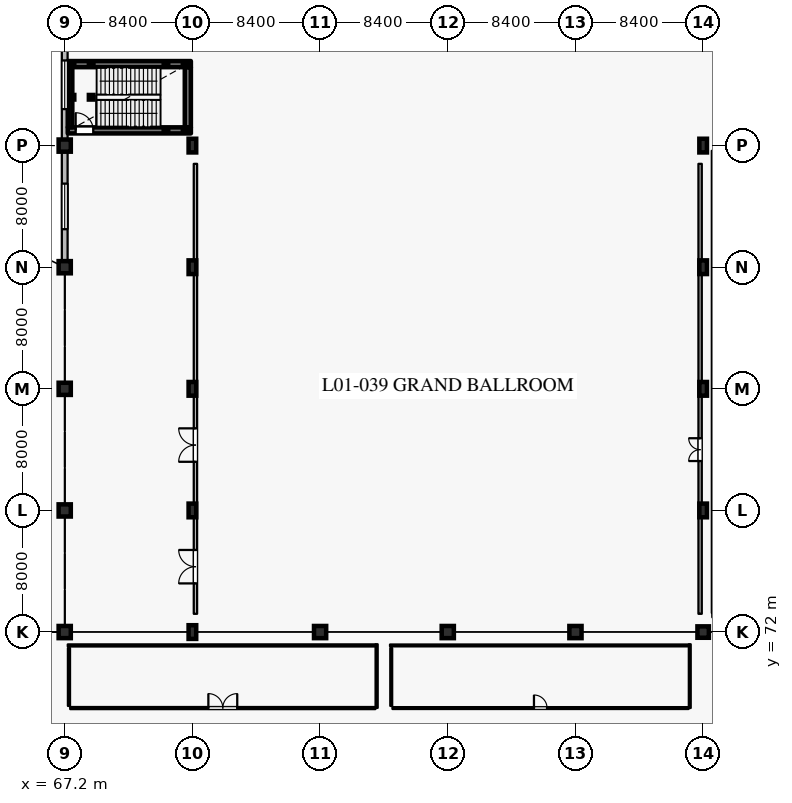
"""IFC4 building model, lengths in metres.
Left out: names, types, materials, properties, quantities, classifications, styles, units other than length and angle.
Written with IfcOpenShell. Run it as: python <this file> out.ifc"""

import sys

from ifc_helpers import new_model, si_unit, direction, frame, frame_2d, origin, origin_2d, place, context, subcontext, project, spatial, rectangle, hollow_rectangle, extrude, element, fill, save


model = new_model("IFC4")
c1 = context("Model", 3, precision=1e-05, world=origin(), true_north=direction((0.0, 1.0)))
c2 = subcontext(c1, "Body", "Model", "MODEL_VIEW")
j1 = project(units=[si_unit("LENGTHUNIT", "METRE"), si_unit("PLANEANGLEUNIT", "RADIAN")], contexts=[c1])
p1 = place(None, origin())
s1 = spatial("IfcSite", under=j1, at=p1, CompositionType="ELEMENT")
p2 = place(p1, origin())
s2 = spatial("IfcBuilding", under=s1, at=p2, CompositionType="ELEMENT")
p3 = place(p2, frame((0.0, 0.0, 6.0)))
s3 = spatial("IfcBuildingStorey", under=s2, at=p3, CompositionType="ELEMENT", Elevation=6.0)
for number, where, z_axis, x_axis in (
    (1, (67.2, 72.0, 0.0), (0.0, 0.0, 1.0), (1.0, 0.0, 0.0)),
    (2, (67.2, 80.0, 0.0), (0.0, 0.0, 1.0), (1.0, 0.0, 0.0)),
    (3, (67.2, 88.0, 0.0), (0.0, 0.0, 1.0), (1.0, 0.0, 0.0)),
    (4, (67.2, 96.0, 0.0), (0.0, 0.0, 1.0), (1.0, 0.0, 0.0)),
    (5, (67.2, 104.0, 0.0), (0.0, 0.0, 1.0), (1.0, 0.0, 0.0)),
):
    element("IfcColumn", number, at=place(p3, frame(where, z_axis=z_axis, x_axis=x_axis)), inside=s3, PredefinedType="COLUMN", context=c2, shape_type="SweptSolid", body=[
        extrude(rectangle(XDim=0.8, YDim=0.8, at=origin_2d()), origin(), (0.0, 0.0, 1.0), 5.4),
    ])
for number, where, z_axis, x_axis in (
    (6, (75.6, 72.0, 0.0), (0.0, 0.0, 1.0), (1.0, 0.0, 0.0)),
    (7, (75.6, 80.0, 0.0), (0.0, 0.0, 1.0), (1.0, 0.0, 0.0)),
    (8, (75.6, 88.0, 0.0), (0.0, 0.0, 1.0), (1.0, 0.0, 0.0)),
    (9, (75.6, 96.0, 0.0), (0.0, 0.0, 1.0), (1.0, 0.0, 0.0)),
    (10, (75.6, 104.0, 0.0), (0.0, 0.0, 1.0), (1.0, 0.0, 0.0)),
):
    element("IfcColumn", number, at=place(p3, frame(where, z_axis=z_axis, x_axis=x_axis)), inside=s3, PredefinedType="COLUMN", context=c2, shape_type="SweptSolid", body=[
        extrude(hollow_rectangle(XDim=0.5, YDim=0.9, WallThickness=0.024, at=origin_2d()), origin(), (0.0, 0.0, 1.0), 5.4),
    ])
for number, where, z_axis, x_axis in (
    (11, (84.0, 72.0, 0.0), (0.0, 0.0, 1.0), (1.0, 0.0, 0.0)),
    (12, (92.4, 72.0, 0.0), (0.0, 0.0, 1.0), (1.0, 0.0, 0.0)),
    (13, (100.8, 72.0, 0.0), (0.0, 0.0, 1.0), (1.0, 0.0, 0.0)),
):
    element("IfcColumn", number, at=place(p3, frame(where, z_axis=z_axis, x_axis=x_axis)), inside=s3, PredefinedType="COLUMN", context=c2, shape_type="SweptSolid", body=[
        extrude(rectangle(XDim=0.8, YDim=0.8, at=origin_2d()), origin(), (0.0, 0.0, 1.0), 5.4),
    ])
p4 = place(p3, frame((109.2, 72.0, 0.0), z_axis=(0.0, 0.0, 1.0), x_axis=(1.0, 0.0, 0.0)))
e14 = element("IfcColumn", 14, at=p4, inside=s3, PredefinedType="COLUMN", context=c2, shape_type="SweptSolid", body=[
    extrude(rectangle(XDim=0.75, YDim=0.75, at=origin_2d()), origin(), (0.0, 0.0, 1.0), 5.4),
])
for number, where, z_axis, x_axis in (
    (15, (109.2, 80.0, 0.0), (0.0, 0.0, 1.0), (1.0, 0.0, 0.0)),
    (16, (109.2, 88.0, 0.0), (0.0, 0.0, 1.0), (1.0, 0.0, 0.0)),
    (17, (109.2, 96.0, 0.0), (0.0, 0.0, 1.0), (1.0, 0.0, 0.0)),
    (18, (109.2, 104.0, 0.0), (0.0, 0.0, 1.0), (1.0, 0.0, 0.0)),
):
    element("IfcColumn", number, at=place(p3, frame(where, z_axis=z_axis, x_axis=x_axis)), inside=s3, PredefinedType="COLUMN", context=c2, shape_type="SweptSolid", body=[
        extrude(hollow_rectangle(XDim=0.5, YDim=0.9, WallThickness=0.024, at=origin_2d()), origin(), (0.0, 0.0, 1.0), 5.4),
    ])
p5 = place(p3, frame((67.2, 96.4, 0.0), z_axis=(0.0, 0.0, 1.0), x_axis=(0.0, 1.0, 0.0)))
e19 = element("IfcWall", 19, at=p5, inside=s3, PredefinedType="SOLIDWALL", context=c2, shape_type="SweptSolid", body=[
    extrude(rectangle(XDim=7.2, YDim=0.38, at=frame_2d((3.6, 0.0))), origin(), (0.0, 0.0, 1.0), 4.67),
])
p6 = place(p5, frame((2.1, 0.0, 1.05)))
e20 = element("IfcOpeningElement", 20, at=p6, cuts=e19, PredefinedType="OPENING", context=c2, shape_type="SweptSolid", body=[
    extrude(rectangle(XDim=3.0, YDim=2.2, at=frame_2d((1.5, 1.1))), frame((0.0, 0.2, 0.0), z_axis=(0.0, -1.0, 0.0), x_axis=(1.0, 0.0, 0.0)), (0.0, 0.0, 1.0), 0.4),
])
p7 = place(p3, frame((67.2, 104.4, 0.0), z_axis=(0.0, 0.0, 1.0), x_axis=(0.0, 1.0, 0.0)))
e21 = element("IfcWall", 21, at=p7, inside=s3, PredefinedType="SOLIDWALL", context=c2, shape_type="SweptSolid", body=[
    extrude(rectangle(XDim=7.2, YDim=0.38, at=frame_2d((3.6, 0.0))), origin(), (0.0, 0.0, 1.0), 4.67),
])
p8 = place(p7, frame((2.0, 0.0, 1.05)))
e22 = element("IfcOpeningElement", 22, at=p8, cuts=e21, PredefinedType="OPENING", context=c2, shape_type="SweptSolid", body=[
    extrude(rectangle(XDim=3.2, YDim=2.4, at=frame_2d((1.6, 1.2))), frame((0.0, 0.2, 0.0), z_axis=(0.0, -1.0, 0.0), x_axis=(1.0, 0.0, 0.0)), (0.0, 0.0, 1.0), 0.4),
])
p9 = place(p3, frame((67.4, 105.0, 0.0), z_axis=(0.0, 0.0, 1.0), x_axis=(1.0, 0.0, 0.0)))
e23 = element("IfcWall", 23, at=p9, inside=s3, PredefinedType="SHEAR", context=c2, shape_type="SweptSolid", body=[
    extrude(rectangle(XDim=8.1, YDim=0.4, at=frame_2d((4.05, 0.0))), origin(), (0.0, 0.0, 1.0), 5.045),
])
p10 = place(p9, frame((0.52, 0.0, 0.0)))
e24 = element("IfcOpeningElement", 24, at=p10, cuts=e23, PredefinedType="OPENING", context=c2, shape_type="SweptSolid", body=[
    extrude(rectangle(XDim=1.16, YDim=2.2, at=frame_2d((0.58, 1.1))), frame((0.0, 0.21, 0.0), z_axis=(0.0, -1.0, 0.0), x_axis=(1.0, 0.0, 0.0)), (0.0, 0.0, 1.0), 0.42),
])
p11 = place(p3, frame((75.3, 105.205, 0.0), z_axis=(0.0, 0.0, 1.0), x_axis=(0.0, 1.0, 0.0)))
e25 = element("IfcWall", 25, at=p11, inside=s3, PredefinedType="SHEAR", context=c2, shape_type="SweptSolid", body=[
    extrude(rectangle(XDim=3.95, YDim=0.4, at=frame_2d((1.975, 0.0))), origin(), (0.0, 0.0, 1.0), 5.045),
])
p12 = place(p3, frame((67.4, 109.36, 0.0), z_axis=(0.0, 0.0, 1.0), x_axis=(1.0, 0.0, 0.0)))
e26 = element("IfcWall", 26, at=p12, inside=s3, PredefinedType="SHEAR", context=c2, shape_type="SweptSolid", body=[
    extrude(rectangle(XDim=8.1, YDim=0.4, at=frame_2d((4.05, 0.0))), origin(), (0.0, 0.0, 1.0), 5.045),
])
p13 = place(p3, frame((67.55, 105.205, 0.0), z_axis=(0.0, 0.0, 1.0), x_axis=(0.0, 1.0, 0.0)))
e27 = element("IfcWall", 27, at=p13, inside=s3, PredefinedType="SHEAR", context=c2, shape_type="SweptSolid", body=[
    extrude(rectangle(XDim=3.95, YDim=0.3, at=frame_2d((1.975, 0.0))), origin(), (0.0, 0.0, 1.0), 5.045),
])
for number, where, z_axis, x_axis in (
    (28, (67.68, 107.18, 0.0), (0.0, 0.0, 1.0), (1.0, 0.0, 0.0)),
    (29, (67.68, 109.36, 0.0), (0.0, 0.0, 1.0), (1.0, 0.0, 0.0)),
    (30, (68.94, 107.18, 0.0), (0.0, 0.0, 1.0), (1.0, 0.0, 0.0)),
    (31, (68.94, 109.36, 0.0), (0.0, 0.0, 1.0), (1.0, 0.0, 0.0)),
):
    element("IfcColumn", number, at=place(p3, frame(where, z_axis=z_axis, x_axis=x_axis)), inside=s3, PredefinedType="COLUMN", context=c2, shape_type="SweptSolid", body=[
        extrude(hollow_rectangle(XDim=0.3, YDim=0.3, WallThickness=0.012, at=origin_2d()), origin(), (0.0, 0.0, 1.0), 5.22),
    ])
for number, where, z_axis, x_axis in (
    (32, (73.86, 105.0, -3.0), (0.0, 0.0, 1.0), (1.0, 0.0, 0.0)),
    (33, (73.86, 109.36, -3.0), (0.0, 0.0, 1.0), (1.0, 0.0, 0.0)),
    (34, (75.12, 105.0, -3.0), (0.0, 0.0, 1.0), (1.0, 0.0, 0.0)),
    (35, (75.12, 109.36, -3.0), (0.0, 0.0, 1.0), (1.0, 0.0, 0.0)),
):
    element("IfcColumn", number, at=place(p3, frame(where, z_axis=z_axis, x_axis=x_axis)), inside=s3, PredefinedType="COLUMN", context=c2, shape_type="SweptSolid", body=[
        extrude(hollow_rectangle(XDim=0.3, YDim=0.3, WallThickness=0.012, at=origin_2d()), origin(), (0.0, 0.0, 1.0), 5.52),
    ])
p14 = place(p3, frame((75.8, 73.2, 0.0), z_axis=(0.0, 0.0, 1.0), x_axis=(0.0, 1.0, 0.0)))
e36 = element("IfcWall", 36, at=p14, inside=s3, PredefinedType="PARTITIONING", context=c2, shape_type="SweptSolid", body=[
    extrude(rectangle(XDim=29.6, YDim=0.22, at=frame_2d((14.8, 0.0))), origin(), (0.0, 0.0, 1.0), 5.045),
])
p15 = place(p14, frame((2.0, 0.0, 0.0)))
e37 = element("IfcOpeningElement", 37, at=p15, cuts=e36, PredefinedType="OPENING", context=c2, shape_type="SweptSolid", body=[
    extrude(rectangle(XDim=2.2, YDim=2.6, at=frame_2d((1.1, 1.3))), frame((0.0, 0.12, 0.0), z_axis=(0.0, -1.0, 0.0), x_axis=(1.0, 0.0, 0.0)), (0.0, 0.0, 1.0), 0.24),
])
p16 = place(p14, frame((10.0, 0.0, 0.0)))
e38 = element("IfcOpeningElement", 38, at=p16, cuts=e36, PredefinedType="OPENING", context=c2, shape_type="SweptSolid", body=[
    extrude(rectangle(XDim=2.2, YDim=2.6, at=frame_2d((1.1, 1.3))), frame((0.0, 0.12, 0.0), z_axis=(0.0, -1.0, 0.0), x_axis=(1.0, 0.0, 0.0)), (0.0, 0.0, 1.0), 0.24),
])
p17 = place(p3, frame((109.0, 73.2, 0.0), z_axis=(0.0, 0.0, 1.0), x_axis=(0.0, 1.0, 0.0)))
e39 = element("IfcWall", 39, at=p17, inside=s3, PredefinedType="PARTITIONING", context=c2, shape_type="SweptSolid", body=[
    extrude(rectangle(XDim=29.6, YDim=0.22, at=frame_2d((14.8, 0.0))), origin(), (0.0, 0.0, 1.0), 5.045),
])
p18 = place(p17, frame((10.05, 0.0, 0.0)))
e40 = element("IfcOpeningElement", 40, at=p18, cuts=e39, PredefinedType="OPENING", context=c2, shape_type="SweptSolid", body=[
    extrude(rectangle(XDim=1.5, YDim=2.3, at=frame_2d((0.75, 1.15))), frame((0.0, 0.12, 0.0), z_axis=(0.0, -1.0, 0.0), x_axis=(1.0, 0.0, 0.0)), (0.0, 0.0, 1.0), 0.24),
])
p19 = place(p3, frame((109.88, 73.25, 0.0), z_axis=(0.0, 0.0, 1.0), x_axis=(0.0, 1.0, 0.0)))
e41 = element("IfcWall", 41, at=p19, inside=s3, PredefinedType="PARTITIONING", context=c2, shape_type="SweptSolid", body=[
    extrude(rectangle(XDim=30.41, YDim=0.22, at=frame_2d((15.205, 0.0))), origin(), (0.0, 0.0, 1.0), 5.045),
])
p20 = place(p3, frame((67.56, 67.0, 0.0), z_axis=(0.0, 0.0, 1.0), x_axis=(1.0, 0.0, 0.0)))
e42 = element("IfcWall", 42, at=p20, inside=s3, PredefinedType="PARTITIONING", context=c2, shape_type="SweptSolid", body=[
    extrude(rectangle(XDim=20.08, YDim=0.14, at=frame_2d((10.04, 0.0))), origin(), (0.0, 0.0, 1.0), 5.045),
])
p21 = place(p20, frame((9.09, 0.0, 0.0)))
e43 = element("IfcOpeningElement", 43, at=p21, cuts=e42, PredefinedType="OPENING", context=c2, shape_type="SweptSolid", body=[
    extrude(rectangle(XDim=1.9, YDim=2.4, at=frame_2d((0.95, 1.2))), frame((0.0, 0.08, 0.0), z_axis=(0.0, -1.0, 0.0), x_axis=(1.0, 0.0, 0.0)), (0.0, 0.0, 1.0), 0.16),
])
p22 = place(p3, frame((67.48, 67.14, 0.0), z_axis=(0.0, 0.0, 1.0), x_axis=(0.0, 1.0, 0.0)))
e44 = element("IfcWall", 44, at=p22, inside=s3, PredefinedType="PARTITIONING", context=c2, shape_type="SweptSolid", body=[
    extrude(rectangle(XDim=3.81, YDim=0.14, at=frame_2d((1.905, 0.0))), origin(), (0.0, 0.0, 1.0), 5.045),
])
p23 = place(p3, frame((88.76, 67.0, 0.0), z_axis=(0.0, 0.0, 1.0), x_axis=(1.0, 0.0, 0.0)))
e45 = element("IfcWall", 45, at=p23, inside=s3, PredefinedType="PARTITIONING", context=c2, shape_type="SweptSolid", body=[
    extrude(rectangle(XDim=19.48, YDim=0.125, at=frame_2d((9.74, 0.0))), origin(), (0.0, 0.0, 1.0), 5.045),
])
p24 = place(p23, frame((9.31, 0.0, 0.0)))
e46 = element("IfcOpeningElement", 46, at=p24, cuts=e45, PredefinedType="OPENING", context=c2, shape_type="SweptSolid", body=[
    extrude(rectangle(XDim=0.86, YDim=2.12, at=frame_2d((0.43, 1.06))), frame((0.0, 0.073, 0.0), z_axis=(0.0, -1.0, 0.0), x_axis=(1.0, 0.0, 0.0)), (0.0, 0.0, 1.0), 0.145),
])
p25 = place(p3, frame((88.68, 67.14, 0.0), z_axis=(0.0, 0.0, 1.0), x_axis=(0.0, 1.0, 0.0)))
e47 = element("IfcWall", 47, at=p25, inside=s3, PredefinedType="PARTITIONING", context=c2, shape_type="SweptSolid", body=[
    extrude(rectangle(XDim=3.81, YDim=0.125, at=frame_2d((1.905, 0.0))), origin(), (0.0, 0.0, 1.0), 5.045),
])
p26 = place(p3, frame((87.72, 67.012, 0.0), z_axis=(0.0, 0.0, 1.0), x_axis=(0.0, 1.0, 0.0)))
e48 = element("IfcWall", 48, at=p26, inside=s3, PredefinedType="PARTITIONING", context=c2, shape_type="SweptSolid", body=[
    extrude(rectangle(XDim=4.188, YDim=0.14, at=frame_2d((2.094, 0.0))), origin(), (0.0, 0.0, 1.0), 5.045),
])
p27 = place(p3, frame((67.4, 71.12, 0.0), z_axis=(0.0, 0.0, 1.0), x_axis=(1.0, 0.0, 0.0)))
e49 = element("IfcWall", 49, at=p27, inside=s3, PredefinedType="PARTITIONING", context=c2, shape_type="SweptSolid", body=[
    extrude(rectangle(XDim=20.25, YDim=0.14, at=frame_2d((10.125, 0.0))), origin(), (0.0, 0.0, 1.0), 5.045),
])
p28 = place(p3, frame((108.32, 67.004, 0.0), z_axis=(0.0, 0.0, 1.0), x_axis=(0.0, 1.0, 0.0)))
e50 = element("IfcWall", 50, at=p28, inside=s3, PredefinedType="PARTITIONING", context=c2, shape_type="SweptSolid", body=[
    extrude(rectangle(XDim=4.196, YDim=0.125, at=frame_2d((2.098, 0.0))), origin(), (0.0, 0.0, 1.0), 5.045),
])
p29 = place(p3, frame((88.6, 71.12, 0.0), z_axis=(0.0, 0.0, 1.0), x_axis=(1.0, 0.0, 0.0)))
e51 = element("IfcWall", 51, at=p29, inside=s3, PredefinedType="PARTITIONING", context=c2, shape_type="SweptSolid", body=[
    extrude(rectangle(XDim=19.658, YDim=0.125, at=frame_2d((9.829, 0.0))), origin(), (0.0, 0.0, 1.0), 5.045),
])
p30 = place(p6, origin())
e52 = element("IfcWindow", 52, at=p30, inside=s3, PartitioningType="DOUBLE_PANEL_VERTICAL", PredefinedType="WINDOW", context=c2, shape_type="SweptSolid", body=[
    extrude(rectangle(XDim=3.0, YDim=2.2, at=frame_2d((1.5, 1.1))), frame((0.0, 0.03, 0.0), z_axis=(0.0, -1.0, 0.0), x_axis=(1.0, 0.0, 0.0)), (0.0, 0.0, 1.0), 0.06),
])
fill(e20, e52)
p31 = place(p8, origin())
e53 = element("IfcWindow", 53, at=p31, inside=s3, PartitioningType="DOUBLE_PANEL_VERTICAL", PredefinedType="WINDOW", context=c2, shape_type="SweptSolid", body=[
    extrude(rectangle(XDim=3.2, YDim=2.4, at=frame_2d((1.6, 1.2))), frame((0.0, 0.03, 0.0), z_axis=(0.0, -1.0, 0.0), x_axis=(1.0, 0.0, 0.0)), (0.0, 0.0, 1.0), 0.06),
])
fill(e22, e53)
p32 = place(p10, origin())
e54 = element("IfcDoor", 54, at=p32, inside=s3, OperationType="SINGLE_SWING_LEFT", PredefinedType="DOOR", context=c2, shape_type="SweptSolid", body=[
    extrude(rectangle(XDim=1.16, YDim=2.2, at=frame_2d((0.58, 1.1))), frame((0.0, 0.025, 0.0), z_axis=(0.0, -1.0, 0.0), x_axis=(1.0, 0.0, 0.0)), (0.0, 0.0, 1.0), 0.05),
])
fill(e24, e54)
p33 = place(p15, origin())
e55 = element("IfcDoor", 55, at=p33, inside=s3, OperationType="DOUBLE_DOOR_SINGLE_SWING", PredefinedType="DOOR", context=c2, shape_type="SweptSolid", body=[
    extrude(rectangle(XDim=2.2, YDim=2.6, at=frame_2d((1.1, 1.3))), frame((0.0, 0.025, 0.0), z_axis=(0.0, -1.0, 0.0), x_axis=(1.0, 0.0, 0.0)), (0.0, 0.0, 1.0), 0.05),
])
fill(e37, e55)
p34 = place(p16, origin())
e56 = element("IfcDoor", 56, at=p34, inside=s3, OperationType="DOUBLE_DOOR_SINGLE_SWING", PredefinedType="DOOR", context=c2, shape_type="SweptSolid", body=[
    extrude(rectangle(XDim=2.2, YDim=2.6, at=frame_2d((1.1, 1.3))), frame((0.0, 0.025, 0.0), z_axis=(0.0, -1.0, 0.0), x_axis=(1.0, 0.0, 0.0)), (0.0, 0.0, 1.0), 0.05),
])
fill(e38, e56)
p35 = place(p18, origin())
e57 = element("IfcDoor", 57, at=p35, inside=s3, OperationType="DOUBLE_DOOR_SINGLE_SWING", PredefinedType="DOOR", context=c2, shape_type="SweptSolid", body=[
    extrude(rectangle(XDim=1.5, YDim=2.3, at=frame_2d((0.75, 1.15))), frame((0.0, 0.025, 0.0), z_axis=(0.0, -1.0, 0.0), x_axis=(1.0, 0.0, 0.0)), (0.0, 0.0, 1.0), 0.05),
])
fill(e40, e57)
p36 = place(p21, origin())
e58 = element("IfcDoor", 58, at=p36, inside=s3, OperationType="DOUBLE_DOOR_SINGLE_SWING", PredefinedType="DOOR", context=c2, shape_type="SweptSolid", body=[
    extrude(rectangle(XDim=1.9, YDim=2.4, at=frame_2d((0.95, 1.2))), frame((0.0, 0.025, 0.0), z_axis=(0.0, -1.0, 0.0), x_axis=(1.0, 0.0, 0.0)), (0.0, 0.0, 1.0), 0.05),
])
fill(e43, e58)
p37 = place(p24, origin())
e59 = element("IfcDoor", 59, at=p37, inside=s3, OperationType="SINGLE_SWING_LEFT", PredefinedType="DOOR", context=c2, shape_type="SweptSolid", body=[
    extrude(rectangle(XDim=0.86, YDim=2.12, at=frame_2d((0.43, 1.06))), frame((0.0, 0.025, 0.0), z_axis=(0.0, -1.0, 0.0), x_axis=(1.0, 0.0, 0.0)), (0.0, 0.0, 1.0), 0.05),
])
fill(e46, e59)
save(model, sys.argv[1])
